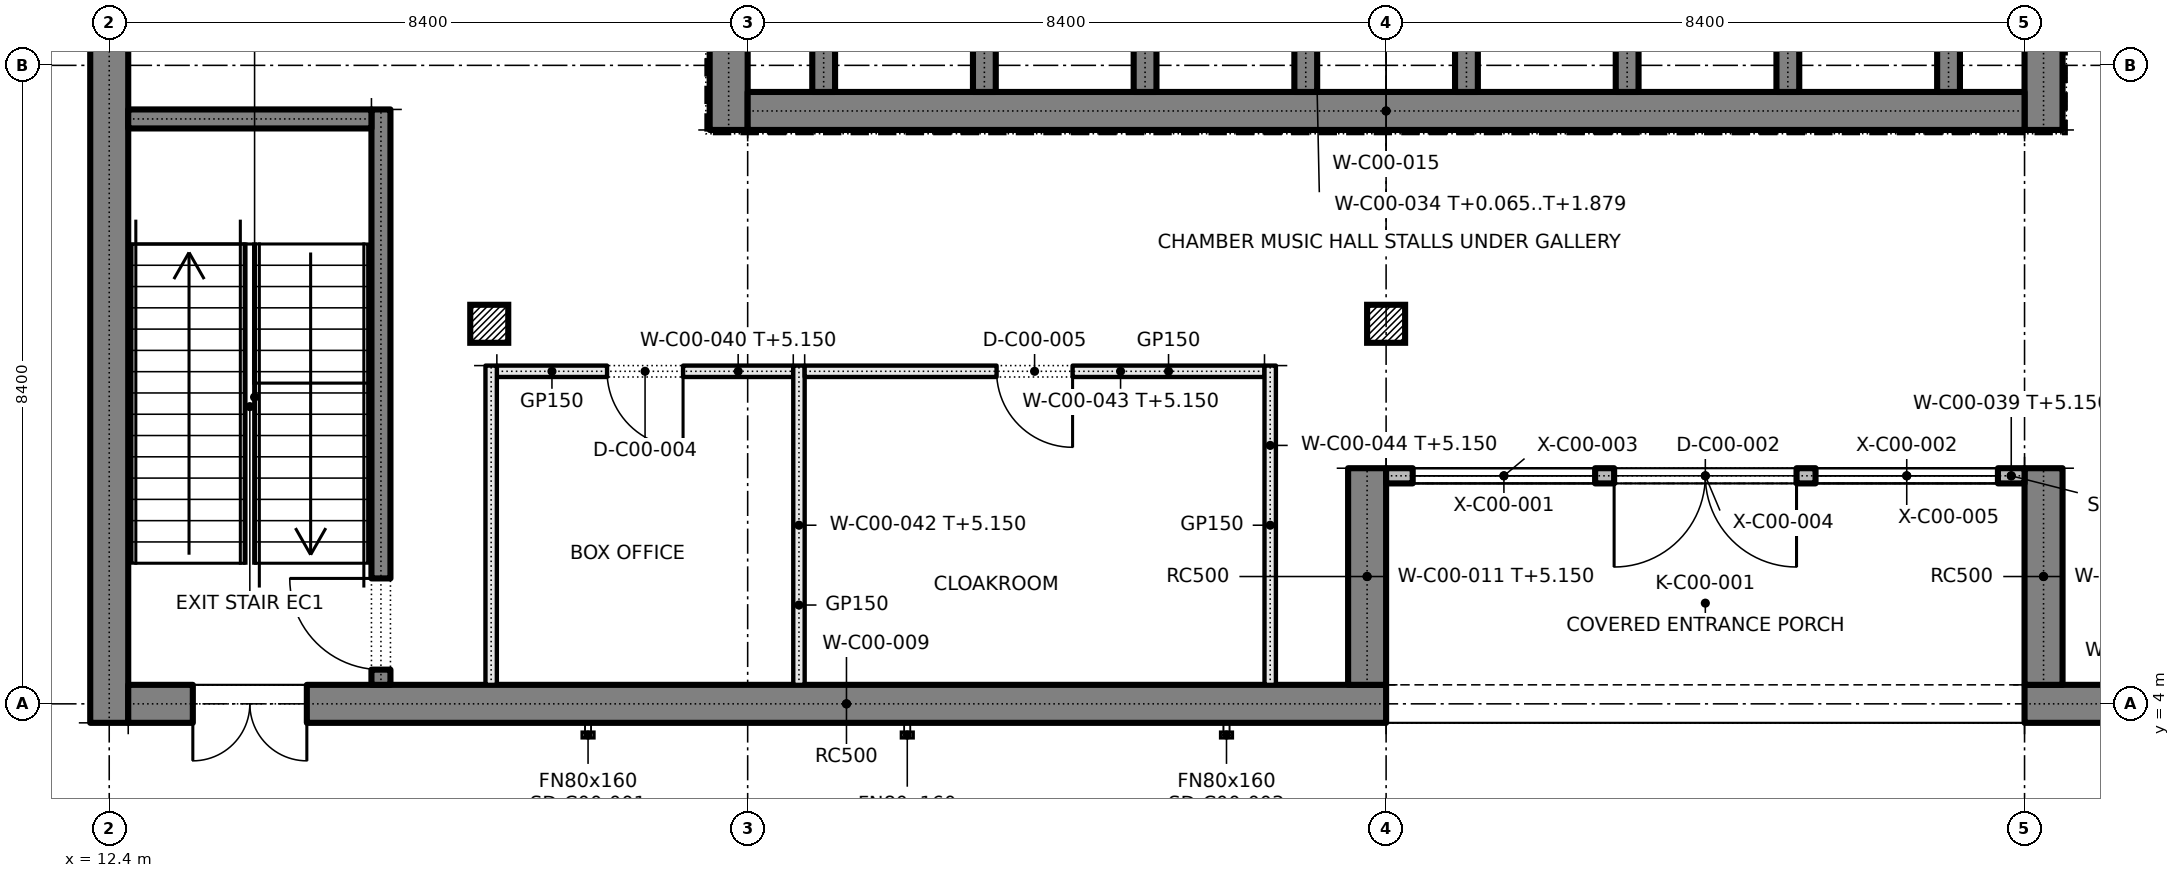
"""IFC4 building model, lengths in metres.
Left out: names, types, materials, properties, quantities, classifications, styles, units other than length and angle.
Written with IfcOpenShell. Run it as: python <this file> out.ifc"""

import sys

from ifc_helpers import new_model, si_unit, direction, frame, frame_2d, origin, origin_2d, place, context, subcontext, project, spatial, polyline, rectangle, outline, extrude, element, fill, save


model = new_model("IFC4")
c1 = context("Model", 3, precision=1e-05, world=origin(), true_north=direction((0.0, 1.0)))
c2 = subcontext(c1, "Body", "Model", "MODEL_VIEW")
j1 = project(units=[si_unit("LENGTHUNIT", "METRE"), si_unit("PLANEANGLEUNIT", "RADIAN")], contexts=[c1])
p1 = place(None, origin())
s1 = spatial("IfcSite", under=j1, at=p1, CompositionType="ELEMENT")
p2 = place(p1, origin())
s2 = spatial("IfcBuilding", under=s1, at=p2, CompositionType="ELEMENT")
p3 = place(p2, origin())
s3 = spatial("IfcBuildingStorey", under=s2, at=p3, CompositionType="ELEMENT", Elevation=0.0)
p4 = place(p3, frame((12.4, 3.75, 0.0), z_axis=(0.0, 0.0, 1.0), x_axis=(0.0, 1.0, 0.0)))
e1 = element("IfcWall", 1, at=p4, inside=s3, PredefinedType="SOLIDWALL", context=c2, shape_type="SweptSolid", body=[
    extrude(rectangle(XDim=42.5, YDim=0.5, at=frame_2d((21.25, 0.0))), origin(), (0.0, 0.0, 1.0), 5.4),
])
p5 = place(p4, frame((40.45, 0.0, 0.0)))
e2 = element("IfcOpeningElement", 2, at=p5, cuts=e1, PredefinedType="OPENING", context=c2, shape_type="SweptSolid", body=[
    extrude(rectangle(XDim=1.5, YDim=2.1, at=frame_2d((0.75, 1.05))), frame((0.0, 0.26, 0.0), z_axis=(0.0, -1.0, 0.0), x_axis=(1.0, 0.0, 0.0)), (0.0, 0.0, 1.0), 0.52),
])
p6 = place(p3, frame((12.65, 4.0, 0.0), z_axis=(0.0, 0.0, 1.0), x_axis=(1.0, 0.0, 0.0)))
e3 = element("IfcWall", 3, at=p6, inside=s3, PredefinedType="SOLIDWALL", context=c2, shape_type="SweptSolid", body=[
    extrude(rectangle(XDim=16.55, YDim=0.5, at=frame_2d((8.275, 0.0))), origin(), (0.0, 0.0, 1.0), 5.4),
])
p7 = place(p6, frame((0.85, 0.0, 0.0)))
e4 = element("IfcOpeningElement", 4, at=p7, cuts=e3, PredefinedType="OPENING", context=c2, shape_type="SweptSolid", body=[
    extrude(rectangle(XDim=1.5, YDim=2.1, at=frame_2d((0.75, 1.05))), frame((0.0, 0.26, 0.0), z_axis=(0.0, -1.0, 0.0), x_axis=(1.0, 0.0, 0.0)), (0.0, 0.0, 1.0), 0.52),
])
p8 = place(p3, frame((37.6, 4.0, 0.0), z_axis=(0.0, 0.0, 1.0), x_axis=(1.0, 0.0, 0.0)))
e5 = element("IfcWall", 5, at=p8, inside=s3, PredefinedType="SOLIDWALL", context=c2, shape_type="SweptSolid", body=[
    extrude(rectangle(XDim=8.15, YDim=0.5, at=frame_2d((4.075, 0.0))), origin(), (0.0, 0.0, 1.0), 5.4),
])
p9 = place(p8, frame((3.0, 0.0, 0.9)))
e6 = element("IfcOpeningElement", 6, at=p9, cuts=e5, PredefinedType="OPENING", context=c2, shape_type="SweptSolid", body=[
    extrude(rectangle(XDim=2.4, YDim=2.4, at=frame_2d((1.2, 1.2))), frame((0.0, 0.26, 0.0), z_axis=(0.0, -1.0, 0.0), x_axis=(1.0, 0.0, 0.0)), (0.0, 0.0, 1.0), 0.52),
])
for number, where, z_axis, x_axis in (
    (7, (28.95, 4.25, 0.0), (0.0, 0.0, 1.0), (0.0, 1.0, 0.0)),
    (8, (37.85, 4.25, 0.0), (0.0, 0.0, 1.0), (0.0, 1.0, 0.0)),
):
    element("IfcWall", number, at=place(p3, frame(where, z_axis=z_axis, x_axis=x_axis)), inside=s3, PredefinedType="SOLIDWALL", context=c2, shape_type="SweptSolid", body=[
        extrude(rectangle(XDim=2.85, YDim=0.5, at=frame_2d((1.425, 0.0))), origin(), (0.0, 0.0, 1.0), 5.15),
    ])
p10 = place(p3, frame((20.55, 11.55, 0.0), z_axis=(0.0, 0.0, 1.0), x_axis=(0.0, 1.0, 0.0)))
e9 = element("IfcWall", 9, at=p10, inside=s3, PredefinedType="SOLIDWALL", context=c2, shape_type="SweptSolid", body=[
    extrude(rectangle(XDim=29.0, YDim=0.5, at=frame_2d((14.5, 0.0))), origin(), (0.0, 0.0, 1.0), 5.4),
])
p11 = place(p10, frame((15.65, 0.0, 0.0)))
e10 = element("IfcOpeningElement", 10, at=p11, cuts=e9, PredefinedType="OPENING", context=c2, shape_type="SweptSolid", body=[
    extrude(rectangle(XDim=2.4, YDim=2.1, at=frame_2d((1.2, 1.05))), frame((0.0, 0.26, 0.0), z_axis=(0.0, -1.0, 0.0), x_axis=(1.0, 0.0, 0.0)), (0.0, 0.0, 1.0), 0.52),
])
p12 = place(p3, frame((37.85, 11.55, 0.0), z_axis=(0.0, 0.0, 1.0), x_axis=(0.0, 1.0, 0.0)))
e11 = element("IfcWall", 11, at=p12, inside=s3, PredefinedType="SOLIDWALL", context=c2, shape_type="SweptSolid", body=[
    extrude(rectangle(XDim=29.0, YDim=0.5, at=frame_2d((14.5, 0.0))), origin(), (0.0, 0.0, 1.0), 5.4),
])
p13 = place(p12, frame((15.65, 0.0, 0.0)))
e12 = element("IfcOpeningElement", 12, at=p13, cuts=e11, PredefinedType="OPENING", context=c2, shape_type="SweptSolid", body=[
    extrude(rectangle(XDim=2.4, YDim=2.1, at=frame_2d((1.2, 1.05))), frame((0.0, 0.26, 0.0), z_axis=(0.0, -1.0, 0.0), x_axis=(1.0, 0.0, 0.0)), (0.0, 0.0, 1.0), 0.52),
])
p14 = place(p12, frame((22.45, 0.0, 1.2)))
e13 = element("IfcOpeningElement", 13, at=p14, cuts=e11, PredefinedType="OPENING", context=c2, shape_type="SweptSolid", body=[
    extrude(rectangle(XDim=1.8, YDim=2.1, at=frame_2d((0.9, 1.05))), frame((0.0, 0.26, 0.0), z_axis=(0.0, -1.0, 0.0), x_axis=(1.0, 0.0, 0.0)), (0.0, 0.0, 1.0), 0.52),
])
p15 = place(p12, frame((26.45, 0.0, 1.2)))
e14 = element("IfcOpeningElement", 14, at=p15, cuts=e11, PredefinedType="OPENING", context=c2, shape_type="SweptSolid", body=[
    extrude(rectangle(XDim=1.2, YDim=2.1, at=frame_2d((0.6, 1.05))), frame((0.0, 0.26, 0.0), z_axis=(0.0, -1.0, 0.0), x_axis=(1.0, 0.0, 0.0)), (0.0, 0.0, 1.0), 0.52),
])
p16 = place(p3, frame((20.8, 11.8, 0.0), z_axis=(0.0, 0.0, 1.0), x_axis=(1.0, 0.0, 0.0)))
e15 = element("IfcWall", 15, at=p16, inside=s3, PredefinedType="SOLIDWALL", context=c2, shape_type="SweptSolid", body=[
    extrude(rectangle(XDim=16.8, YDim=0.5, at=frame_2d((8.4, 0.0))), origin(), (0.0, 0.0, 1.0), 5.4),
])
p17 = place(p3, frame((15.975, 4.25, 0.0), z_axis=(0.0, 0.0, 1.0), x_axis=(0.0, 1.0, 0.0)))
e16 = element("IfcWall", 16, at=p17, inside=s3, PredefinedType="SOLIDWALL", context=c2, shape_type="SweptSolid", body=[
    extrude(rectangle(XDim=7.57, YDim=0.25, at=frame_2d((3.785, 0.0))), origin(), (0.0, 0.0, 1.0), 5.4),
])
p18 = place(p17, frame((0.2, 0.0, 0.0)))
e17 = element("IfcOpeningElement", 17, at=p18, cuts=e16, PredefinedType="OPENING", context=c2, shape_type="SweptSolid", body=[
    extrude(rectangle(XDim=1.2, YDim=2.1, at=frame_2d((0.6, 1.05))), frame((0.0, 0.135, 0.0), z_axis=(0.0, -1.0, 0.0), x_axis=(1.0, 0.0, 0.0)), (0.0, 0.0, 1.0), 0.27),
])
p19 = place(p3, frame((12.65, 11.695, 0.0), z_axis=(0.0, 0.0, 1.0), x_axis=(1.0, 0.0, 0.0)))
e18 = element("IfcWall", 18, at=p19, inside=s3, PredefinedType="SOLIDWALL", context=c2, shape_type="SweptSolid", body=[
    extrude(rectangle(XDim=3.2, YDim=0.25, at=frame_2d((1.6, 0.0))), origin(), (0.0, 0.0, 1.0), 5.4),
])
for number, where, z_axis, x_axis in (
    (19, (17.4, 9.0, 0.0), (0.0, 0.0, 1.0), (1.0, 0.0, 0.0)),
    (20, (29.2, 9.0, 0.0), (0.0, 0.0, 1.0), (1.0, 0.0, 0.0)),
):
    element("IfcColumn", number, at=place(p3, frame(where, z_axis=z_axis, x_axis=x_axis)), inside=s3, PredefinedType="COLUMN", context=c2, shape_type="SweptSolid", body=[
        extrude(rectangle(XDim=0.5, YDim=0.5, at=origin_2d()), origin(), (0.0, 0.0, 1.0), 5.4),
    ])
for number, where, z_axis, x_axis in (
    (21, (21.8, 12.05, 0.0), (0.0, 0.0, 1.0), (0.0, 1.0, 0.0)),
    (22, (23.914, 12.05, 0.0), (0.0, 0.0, 1.0), (0.0, 1.0, 0.0)),
    (23, (26.029, 12.05, 0.0), (0.0, 0.0, 1.0), (0.0, 1.0, 0.0)),
    (24, (28.143, 12.05, 0.0), (0.0, 0.0, 1.0), (0.0, 1.0, 0.0)),
    (25, (30.257, 12.05, 0.0), (0.0, 0.0, 1.0), (0.0, 1.0, 0.0)),
    (26, (32.371, 12.05, 0.0), (0.0, 0.0, 1.0), (0.0, 1.0, 0.0)),
    (27, (34.486, 12.05, 0.0), (0.0, 0.0, 1.0), (0.0, 1.0, 0.0)),
    (28, (36.6, 12.05, 0.0), (0.0, 0.0, 1.0), (0.0, 1.0, 0.0)),
):
    element("IfcWall", number, at=place(p3, frame(where, z_axis=z_axis, x_axis=x_axis)), inside=s3, PredefinedType="SOLIDWALL", context=c2, shape_type="SweptSolid", body=[
        extrude(outline(polyline([(0.0, 0.0), (13.95, 0.0), (13.95, 0.065), (0.0, 1.878), (0.0, 0.0)])), frame((0.0, 0.15, 0.0), z_axis=(0.0, -1.0, 0.0), x_axis=(1.0, 0.0, 0.0)), (0.0, 0.0, 1.0), 0.3),
    ])
p20 = place(p3, frame((12.4, 3.77, -0.41), z_axis=(0.0, 0.0, 1.0), x_axis=(0.0, 1.0, 0.0)))
e29 = element("IfcWall", 29, at=p20, inside=s3, PredefinedType="SOLIDWALL", context=c2, shape_type="SweptSolid", body=[
    extrude(rectangle(XDim=42.46, YDim=0.5, at=frame_2d((21.23, 0.0))), origin(), (0.0, 0.0, 1.0), 0.41),
])
p21 = place(p3, frame((12.65, 4.0, -0.41), z_axis=(0.0, 0.0, 1.0), x_axis=(1.0, 0.0, 0.0)))
e30 = element("IfcWall", 30, at=p21, inside=s3, PredefinedType="SOLIDWALL", context=c2, shape_type="SweptSolid", body=[
    extrude(rectangle(XDim=16.53, YDim=0.5, at=frame_2d((8.265, 0.0))), origin(), (0.0, 0.0, 1.0), 0.41),
])
p22 = place(p3, frame((37.62, 4.0, -0.41), z_axis=(0.0, 0.0, 1.0), x_axis=(1.0, 0.0, 0.0)))
e31 = element("IfcWall", 31, at=p22, inside=s3, PredefinedType="SOLIDWALL", context=c2, shape_type="SweptSolid", body=[
    extrude(rectangle(XDim=8.13, YDim=0.5, at=frame_2d((4.065, 0.0))), origin(), (0.0, 0.0, 1.0), 0.41),
])
for number, where, z_axis, x_axis in (
    (32, (20.55, 11.57, -0.41), (0.0, 0.0, 1.0), (0.0, 1.0, 0.0)),
    (33, (37.85, 11.57, -0.41), (0.0, 0.0, 1.0), (0.0, 1.0, 0.0)),
):
    element("IfcWall", number, at=place(p3, frame(where, z_axis=z_axis, x_axis=x_axis)), inside=s3, PredefinedType="SOLIDWALL", context=c2, shape_type="SweptSolid", body=[
        extrude(rectangle(XDim=28.96, YDim=0.5, at=frame_2d((14.48, 0.0))), origin(), (0.0, 0.0, 1.0), 0.41),
    ])
p23 = place(p3, frame((20.8, 11.8, -0.41), z_axis=(0.0, 0.0, 1.0), x_axis=(1.0, 0.0, 0.0)))
e34 = element("IfcWall", 34, at=p23, inside=s3, PredefinedType="SOLIDWALL", context=c2, shape_type="SweptSolid", body=[
    extrude(rectangle(XDim=16.8, YDim=0.5, at=frame_2d((8.4, 0.0))), origin(), (0.0, 0.0, 1.0), 0.41),
])
for number, where, z_axis, x_axis in (
    (35, (21.8, 12.05, -0.3), (0.0, 0.0, 1.0), (0.0, 1.0, 0.0)),
    (36, (23.914, 12.05, -0.3), (0.0, 0.0, 1.0), (0.0, 1.0, 0.0)),
    (37, (26.029, 12.05, -0.3), (0.0, 0.0, 1.0), (0.0, 1.0, 0.0)),
    (38, (28.143, 12.05, -0.3), (0.0, 0.0, 1.0), (0.0, 1.0, 0.0)),
    (39, (30.257, 12.05, -0.3), (0.0, 0.0, 1.0), (0.0, 1.0, 0.0)),
    (40, (32.371, 12.05, -0.3), (0.0, 0.0, 1.0), (0.0, 1.0, 0.0)),
    (41, (34.486, 12.05, -0.3), (0.0, 0.0, 1.0), (0.0, 1.0, 0.0)),
    (42, (36.6, 12.05, -0.3), (0.0, 0.0, 1.0), (0.0, 1.0, 0.0)),
):
    element("IfcWall", number, at=place(p3, frame(where, z_axis=z_axis, x_axis=x_axis)), inside=s3, PredefinedType="SOLIDWALL", context=c2, shape_type="SweptSolid", body=[
        extrude(rectangle(XDim=13.93, YDim=0.3, at=frame_2d((6.965, 0.0))), origin(), (0.0, 0.0, 1.0), 0.3),
    ])
p24 = place(p3, frame((29.2, 7.0, 0.0), z_axis=(0.0, 0.0, 1.0), x_axis=(1.0, 0.0, 0.0)))
e43 = element("IfcWall", 43, at=p24, inside=s3, PredefinedType="PARTITIONING", context=c2, shape_type="SweptSolid", body=[
    extrude(rectangle(XDim=8.4, YDim=0.2, at=frame_2d((4.2, 0.0))), origin(), (0.0, 0.0, 1.0), 5.15),
])
p25 = place(p24, frame((3.0, 0.0, 0.0)))
e44 = element("IfcOpeningElement", 44, at=p25, cuts=e43, PredefinedType="OPENING", context=c2, shape_type="SweptSolid", body=[
    extrude(rectangle(XDim=2.4, YDim=2.5, at=frame_2d((1.2, 1.25))), frame((0.0, 0.11, 0.0), z_axis=(0.0, -1.0, 0.0), x_axis=(1.0, 0.0, 0.0)), (0.0, 0.0, 1.0), 0.22),
])
p26 = place(p24, frame((0.35, 0.0, 0.15)))
e45 = element("IfcOpeningElement", 45, at=p26, cuts=e43, PredefinedType="OPENING", context=c2, shape_type="SweptSolid", body=[
    extrude(rectangle(XDim=2.4, YDim=2.35, at=frame_2d((1.2, 1.175))), frame((0.0, 0.11, 0.0), z_axis=(0.0, -1.0, 0.0), x_axis=(1.0, 0.0, 0.0)), (0.0, 0.0, 1.0), 0.22),
])
p27 = place(p24, frame((5.65, 0.0, 0.15)))
e46 = element("IfcOpeningElement", 46, at=p27, cuts=e43, PredefinedType="OPENING", context=c2, shape_type="SweptSolid", body=[
    extrude(rectangle(XDim=2.4, YDim=2.35, at=frame_2d((1.2, 1.175))), frame((0.0, 0.11, 0.0), z_axis=(0.0, -1.0, 0.0), x_axis=(1.0, 0.0, 0.0)), (0.0, 0.0, 1.0), 0.22),
])
p28 = place(p24, frame((0.35, 0.0, 2.6)))
e47 = element("IfcOpeningElement", 47, at=p28, cuts=e43, PredefinedType="OPENING", context=c2, shape_type="SweptSolid", body=[
    extrude(rectangle(XDim=2.4, YDim=2.4, at=frame_2d((1.2, 1.2))), frame((0.0, 0.11, 0.0), z_axis=(0.0, -1.0, 0.0), x_axis=(1.0, 0.0, 0.0)), (0.0, 0.0, 1.0), 0.22),
])
p29 = place(p24, frame((3.0, 0.0, 2.6)))
e48 = element("IfcOpeningElement", 48, at=p29, cuts=e43, PredefinedType="OPENING", context=c2, shape_type="SweptSolid", body=[
    extrude(rectangle(XDim=2.4, YDim=2.4, at=frame_2d((1.2, 1.2))), frame((0.0, 0.11, 0.0), z_axis=(0.0, -1.0, 0.0), x_axis=(1.0, 0.0, 0.0)), (0.0, 0.0, 1.0), 0.22),
])
p30 = place(p24, frame((5.65, 0.0, 2.6)))
e49 = element("IfcOpeningElement", 49, at=p30, cuts=e43, PredefinedType="OPENING", context=c2, shape_type="SweptSolid", body=[
    extrude(rectangle(XDim=2.4, YDim=2.4, at=frame_2d((1.2, 1.2))), frame((0.0, 0.11, 0.0), z_axis=(0.0, -1.0, 0.0), x_axis=(1.0, 0.0, 0.0)), (0.0, 0.0, 1.0), 0.22),
])
p31 = place(p3, frame((17.5, 8.375, 0.0), z_axis=(0.0, 0.0, 1.0), x_axis=(1.0, 0.0, 0.0)))
e50 = element("IfcWall", 50, at=p31, inside=s3, PredefinedType="PARTITIONING", context=c2, shape_type="SweptSolid", body=[
    extrude(rectangle(XDim=3.9, YDim=0.15, at=frame_2d((1.95, 0.0))), origin(), (0.0, 0.0, 1.0), 5.15),
])
p32 = place(p31, frame((1.45, 0.0, 0.0)))
e51 = element("IfcOpeningElement", 51, at=p32, cuts=e50, PredefinedType="OPENING", context=c2, shape_type="SweptSolid", body=[
    extrude(rectangle(XDim=1.0, YDim=2.1, at=frame_2d((0.5, 1.05))), frame((0.0, 0.085, 0.0), z_axis=(0.0, -1.0, 0.0), x_axis=(1.0, 0.0, 0.0)), (0.0, 0.0, 1.0), 0.17),
])
for number, where, z_axis, x_axis in (
    (52, (17.425, 4.25, 0.0), (0.0, 0.0, 1.0), (0.0, 1.0, 0.0)),
    (53, (21.475, 4.25, 0.0), (0.0, 0.0, 1.0), (0.0, 1.0, 0.0)),
):
    element("IfcWall", number, at=place(p3, frame(where, z_axis=z_axis, x_axis=x_axis)), inside=s3, PredefinedType="PARTITIONING", context=c2, shape_type="SweptSolid", body=[
        extrude(rectangle(XDim=4.2, YDim=0.15, at=frame_2d((2.1, 0.0))), origin(), (0.0, 0.0, 1.0), 5.15),
    ])
p33 = place(p3, frame((21.55, 8.375, 0.0), z_axis=(0.0, 0.0, 1.0), x_axis=(1.0, 0.0, 0.0)))
e54 = element("IfcWall", 54, at=p33, inside=s3, PredefinedType="PARTITIONING", context=c2, shape_type="SweptSolid", body=[
    extrude(rectangle(XDim=6.05, YDim=0.15, at=frame_2d((3.025, 0.0))), origin(), (0.0, 0.0, 1.0), 5.15),
])
p34 = place(p33, frame((2.525, 0.0, 0.0)))
e55 = element("IfcOpeningElement", 55, at=p34, cuts=e54, PredefinedType="OPENING", context=c2, shape_type="SweptSolid", body=[
    extrude(rectangle(XDim=1.0, YDim=2.1, at=frame_2d((0.5, 1.05))), frame((0.0, 0.085, 0.0), z_axis=(0.0, -1.0, 0.0), x_axis=(1.0, 0.0, 0.0)), (0.0, 0.0, 1.0), 0.17),
])
p35 = place(p3, frame((27.675, 4.25, 0.0), z_axis=(0.0, 0.0, 1.0), x_axis=(0.0, 1.0, 0.0)))
e56 = element("IfcWall", 56, at=p35, inside=s3, PredefinedType="PARTITIONING", context=c2, shape_type="SweptSolid", body=[
    extrude(rectangle(XDim=4.2, YDim=0.15, at=frame_2d((2.1, 0.0))), origin(), (0.0, 0.0, 1.0), 5.15),
])
p36 = place(p25, frame((2.4, 0.0, 0.0), z_axis=(0.0, 0.0, 1.0), x_axis=(-1.0, 0.0, 0.0)))
e57 = element("IfcDoor", 57, at=p36, inside=s3, OperationType="DOUBLE_DOOR_SINGLE_SWING", PredefinedType="DOOR", context=c2, shape_type="SweptSolid", body=[
    extrude(rectangle(XDim=2.4, YDim=2.5, at=frame_2d((1.2, 1.25))), frame((0.0, 0.025, 0.0), z_axis=(0.0, -1.0, 0.0), x_axis=(1.0, 0.0, 0.0)), (0.0, 0.0, 1.0), 0.05),
])
fill(e44, e57)
p37 = place(p26, origin())
e58 = element("IfcWindow", 58, at=p37, inside=s3, PartitioningType="SINGLE_PANEL", PredefinedType="WINDOW", context=c2, shape_type="SweptSolid", body=[
    extrude(rectangle(XDim=2.4, YDim=2.35, at=frame_2d((1.2, 1.175))), frame((0.0, 0.03, 0.0), z_axis=(0.0, -1.0, 0.0), x_axis=(1.0, 0.0, 0.0)), (0.0, 0.0, 1.0), 0.06),
])
fill(e45, e58)
p38 = place(p27, origin())
e59 = element("IfcWindow", 59, at=p38, inside=s3, PartitioningType="SINGLE_PANEL", PredefinedType="WINDOW", context=c2, shape_type="SweptSolid", body=[
    extrude(rectangle(XDim=2.4, YDim=2.35, at=frame_2d((1.2, 1.175))), frame((0.0, 0.03, 0.0), z_axis=(0.0, -1.0, 0.0), x_axis=(1.0, 0.0, 0.0)), (0.0, 0.0, 1.0), 0.06),
])
fill(e46, e59)
p39 = place(p28, origin())
e60 = element("IfcWindow", 60, at=p39, inside=s3, PartitioningType="SINGLE_PANEL", PredefinedType="WINDOW", context=c2, shape_type="SweptSolid", body=[
    extrude(rectangle(XDim=2.4, YDim=2.4, at=frame_2d((1.2, 1.2))), frame((0.0, 0.03, 0.0), z_axis=(0.0, -1.0, 0.0), x_axis=(1.0, 0.0, 0.0)), (0.0, 0.0, 1.0), 0.06),
])
fill(e47, e60)
p40 = place(p29, origin())
e61 = element("IfcWindow", 61, at=p40, inside=s3, PartitioningType="SINGLE_PANEL", PredefinedType="WINDOW", context=c2, shape_type="SweptSolid", body=[
    extrude(rectangle(XDim=2.4, YDim=2.4, at=frame_2d((1.2, 1.2))), frame((0.0, 0.03, 0.0), z_axis=(0.0, -1.0, 0.0), x_axis=(1.0, 0.0, 0.0)), (0.0, 0.0, 1.0), 0.06),
])
fill(e48, e61)
p41 = place(p30, origin())
e62 = element("IfcWindow", 62, at=p41, inside=s3, PartitioningType="SINGLE_PANEL", PredefinedType="WINDOW", context=c2, shape_type="SweptSolid", body=[
    extrude(rectangle(XDim=2.4, YDim=2.4, at=frame_2d((1.2, 1.2))), frame((0.0, 0.03, 0.0), z_axis=(0.0, -1.0, 0.0), x_axis=(1.0, 0.0, 0.0)), (0.0, 0.0, 1.0), 0.06),
])
fill(e49, e62)
p42 = place(p32, frame((1.0, 0.0, 0.0), z_axis=(0.0, 0.0, 1.0), x_axis=(-1.0, 0.0, 0.0)))
e63 = element("IfcDoor", 63, at=p42, inside=s3, OperationType="SINGLE_SWING_LEFT", PredefinedType="DOOR", context=c2, shape_type="SweptSolid", body=[
    extrude(rectangle(XDim=1.0, YDim=2.1, at=frame_2d((0.5, 1.05))), frame((0.0, 0.025, 0.0), z_axis=(0.0, -1.0, 0.0), x_axis=(1.0, 0.0, 0.0)), (0.0, 0.0, 1.0), 0.05),
])
fill(e51, e63)
p43 = place(p34, frame((1.0, 0.0, 0.0), z_axis=(0.0, 0.0, 1.0), x_axis=(-1.0, 0.0, 0.0)))
e64 = element("IfcDoor", 64, at=p43, inside=s3, OperationType="SINGLE_SWING_LEFT", PredefinedType="DOOR", context=c2, shape_type="SweptSolid", body=[
    extrude(rectangle(XDim=1.0, YDim=2.1, at=frame_2d((0.5, 1.05))), frame((0.0, 0.025, 0.0), z_axis=(0.0, -1.0, 0.0), x_axis=(1.0, 0.0, 0.0)), (0.0, 0.0, 1.0), 0.05),
])
fill(e55, e64)
p44 = place(p18, origin())
e65 = element("IfcDoor", 65, at=p44, inside=s3, OperationType="SINGLE_SWING_RIGHT", PredefinedType="DOOR", context=c2, shape_type="SweptSolid", body=[
    extrude(rectangle(XDim=1.2, YDim=2.1, at=frame_2d((0.6, 1.05))), frame((0.0, 0.025, 0.0), z_axis=(0.0, -1.0, 0.0), x_axis=(1.0, 0.0, 0.0)), (0.0, 0.0, 1.0), 0.05),
])
fill(e17, e65)
p45 = place(p7, frame((1.5, 0.0, 0.0), z_axis=(0.0, 0.0, 1.0), x_axis=(-1.0, 0.0, 0.0)))
e66 = element("IfcDoor", 66, at=p45, inside=s3, OperationType="DOUBLE_DOOR_SINGLE_SWING", PredefinedType="DOOR", context=c2, shape_type="SweptSolid", body=[
    extrude(rectangle(XDim=1.5, YDim=2.1, at=frame_2d((0.75, 1.05))), frame((0.0, 0.025, 0.0), z_axis=(0.0, -1.0, 0.0), x_axis=(1.0, 0.0, 0.0)), (0.0, 0.0, 1.0), 0.05),
])
fill(e4, e66)
save(model, sys.argv[1])
